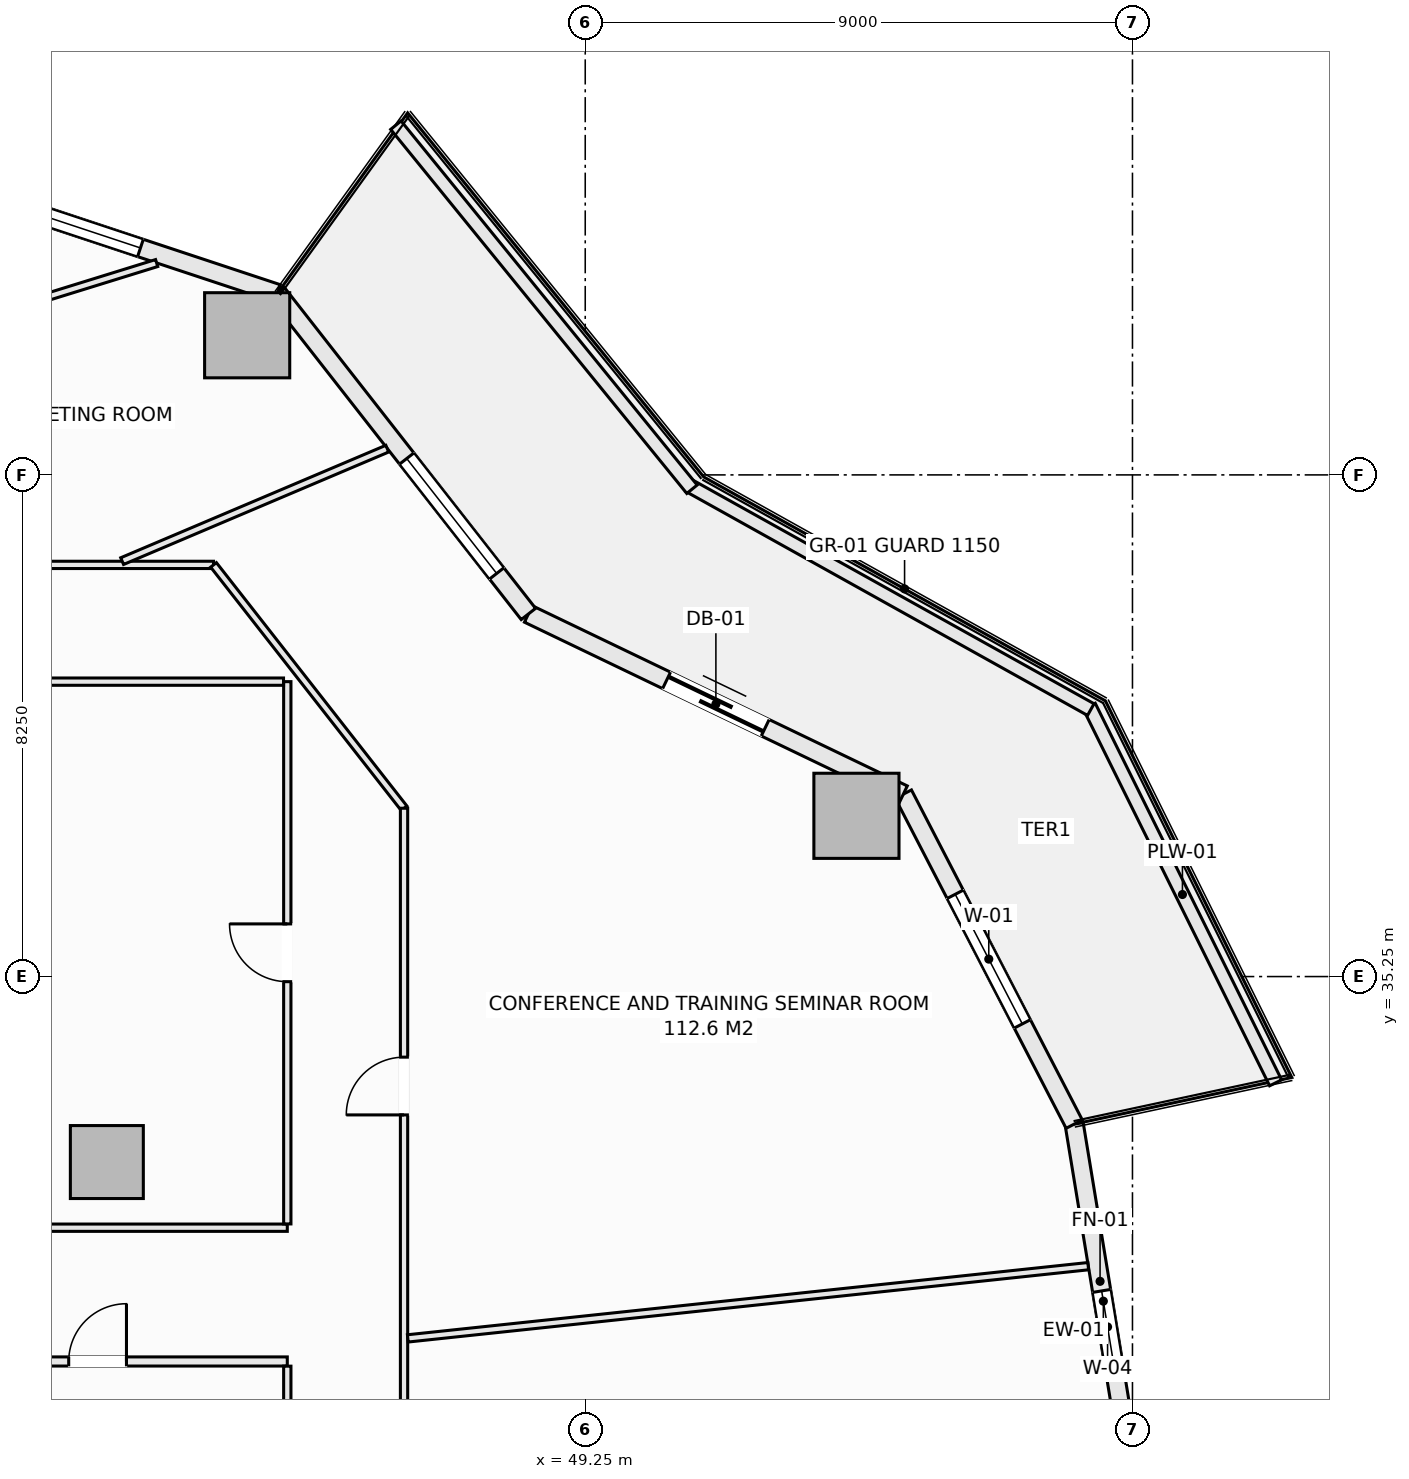
"""IFC4 building model, lengths in metres.
Left out: names, types, materials, properties, quantities, classifications, styles, units other than length and angle.
Written with IfcOpenShell. Run it as: python <this file> out.ifc"""

import sys

from ifc_helpers import new_model, si_unit, direction, frame, frame_2d, origin, origin_2d, place, context, subcontext, project, spatial, rectangle, extrude, element, fill, save


model = new_model("IFC4")
c1 = context("Model", 3, precision=1e-05, world=origin(), true_north=direction((0.0, 1.0)))
c2 = subcontext(c1, "Body", "Model", "MODEL_VIEW")
j1 = project(units=[si_unit("LENGTHUNIT", "METRE"), si_unit("PLANEANGLEUNIT", "RADIAN")], contexts=[c1])
p1 = place(None, origin())
s1 = spatial("IfcSite", under=j1, at=p1, CompositionType="ELEMENT")
p2 = place(p1, origin())
s2 = spatial("IfcBuilding", under=s1, at=p2, CompositionType="ELEMENT")
p3 = place(p2, frame((0.0, 0.0, 41.9)))
s3 = spatial("IfcBuildingStorey", under=s2, at=p3, CompositionType="ELEMENT", Elevation=41.9)
for number, where, z_axis, x_axis in (
    (1, (53.71, 37.894, -0.28), (0.0, 0.0, 1.0), (1.0, 0.0, 0.0)),
    (2, (43.69, 45.796, -0.28), (0.0, 0.0, 1.0), (1.0, 0.0, 0.0)),
):
    element("IfcColumn", number, at=place(p3, frame(where, z_axis=z_axis, x_axis=x_axis)), inside=s3, PredefinedType="COLUMN", context=c2, shape_type="SweptSolid", body=[
        extrude(rectangle(XDim=1.4, YDim=1.4, at=origin_2d()), origin(), (0.0, 0.0, 1.0), 3.85),
    ])
p4 = place(p3, frame((41.382, 32.199, -0.28), z_axis=(0.0, 0.0, 1.0), x_axis=(1.0, 0.0, 0.0)))
e3 = element("IfcColumn", 3, at=p4, inside=s3, PredefinedType="COLUMN", context=c2, shape_type="SweptSolid", body=[
    extrude(rectangle(XDim=1.2, YDim=1.2, at=origin_2d()), origin(), (0.0, 0.0, 1.0), 3.85),
])
p5 = place(p3, frame((57.292, 32.823, 0.0), z_axis=(0.0, 0.0, 1.0), x_axis=(0.162366057843, -0.98673059305, 0.0)))
e4 = element("IfcWall", 4, at=p5, inside=s3, PredefinedType="SOLIDWALL", context=c2, shape_type="SweptSolid", body=[
    extrude(rectangle(XDim=5.902, YDim=0.3, at=frame_2d((2.951, 0.0))), origin(), (0.0, 0.0, 1.0), 3.093),
])
p6 = place(p5, frame((2.78, 0.0, 0.72)))
e5 = element("IfcOpeningElement", 5, at=p6, cuts=e4, PredefinedType="OPENING", context=c2, shape_type="SweptSolid", body=[
    extrude(rectangle(XDim=1.2, YDim=1.65, at=frame_2d((0.6, 0.825))), frame((0.0, 0.16, 0.0), z_axis=(0.0, -1.0, 0.0), x_axis=(1.0, 0.0, 0.0)), (0.0, 0.0, 1.0), 0.32),
])
p7 = place(p3, frame((54.482, 38.25, 0.0), z_axis=(0.0, 0.0, 1.0), x_axis=(0.459809804413, -0.88801742312, 0.0)))
e6 = element("IfcWall", 6, at=p7, inside=s3, PredefinedType="SOLIDWALL", context=c2, shape_type="SweptSolid", body=[
    extrude(rectangle(XDim=6.111, YDim=0.3, at=frame_2d((3.055, 0.0))), origin(), (0.0, 0.0, 1.0), 3.093),
])
p8 = place(p7, frame((1.855, 0.0, 0.85)))
e7 = element("IfcOpeningElement", 7, at=p8, cuts=e6, PredefinedType="OPENING", context=c2, shape_type="SweptSolid", body=[
    extrude(rectangle(XDim=2.4, YDim=1.9, at=frame_2d((1.2, 0.95))), frame((0.0, 0.16, 0.0), z_axis=(0.0, -1.0, 0.0), x_axis=(1.0, 0.0, 0.0)), (0.0, 0.0, 1.0), 0.32),
])
p9 = place(p3, frame((48.315, 41.213, 0.0), z_axis=(0.0, 0.0, 1.0), x_axis=(0.901360393999, -0.433069786673, 0.0)))
e8 = element("IfcWall", 8, at=p9, inside=s3, PredefinedType="SOLIDWALL", context=c2, shape_type="SweptSolid", body=[
    extrude(rectangle(XDim=6.842, YDim=0.3, at=frame_2d((3.421, 0.0))), origin(), (0.0, 0.0, 1.0), 3.093),
])
p10 = place(p9, frame((2.521, 0.0, 0.0)))
e9 = element("IfcOpeningElement", 9, at=p10, cuts=e8, PredefinedType="OPENING", context=c2, shape_type="SweptSolid", body=[
    extrude(rectangle(XDim=1.8, YDim=2.25, at=frame_2d((0.9, 1.125))), frame((0.0, 0.16, 0.0), z_axis=(0.0, -1.0, 0.0), x_axis=(1.0, 0.0, 0.0)), (0.0, 0.0, 1.0), 0.32),
])
p11 = place(p3, frame((44.188, 46.486, 0.0), z_axis=(0.0, 0.0, 1.0), x_axis=(0.616421309777, -0.787416515482, 0.0)))
e10 = element("IfcWall", 10, at=p11, inside=s3, PredefinedType="SOLIDWALL", context=c2, shape_type="SweptSolid", body=[
    extrude(rectangle(XDim=6.696, YDim=0.3, at=frame_2d((3.348, 0.0))), origin(), (0.0, 0.0, 1.0), 3.093),
])
p12 = place(p11, frame((3.45, 0.0, 0.85)))
e11 = element("IfcOpeningElement", 11, at=p12, cuts=e10, PredefinedType="OPENING", context=c2, shape_type="SweptSolid", body=[
    extrude(rectangle(XDim=2.4, YDim=1.9, at=frame_2d((1.2, 0.95))), frame((0.0, 0.16, 0.0), z_axis=(0.0, -1.0, 0.0), x_axis=(1.0, 0.0, 0.0)), (0.0, 0.0, 1.0), 0.32),
])
p13 = place(p3, frame((37.404, 48.733, 0.0), z_axis=(0.0, 0.0, 1.0), x_axis=(0.949238715533, -0.31455661006, 0.0)))
e12 = element("IfcWall", 12, at=p13, inside=s3, PredefinedType="SOLIDWALL", context=c2, shape_type="SweptSolid", body=[
    extrude(rectangle(XDim=7.146, YDim=0.3, at=frame_2d((3.573, 0.0))), origin(), (0.0, 0.0, 1.0), 3.093),
])
p14 = place(p13, frame((2.373, 0.0, 0.85)))
e13 = element("IfcOpeningElement", 13, at=p14, cuts=e12, PredefinedType="OPENING", context=c2, shape_type="SweptSolid", body=[
    extrude(rectangle(XDim=2.4, YDim=1.9, at=frame_2d((1.2, 0.95))), frame((0.0, 0.16, 0.0), z_axis=(0.0, -1.0, 0.0), x_axis=(1.0, 0.0, 0.0)), (0.0, 0.0, 1.0), 0.32),
])
p15 = place(p3, frame((57.539, 39.697, 0.0), z_axis=(0.0, 0.0, 1.0), x_axis=(0.443578479433, -0.8962355341, 0.0)))
e14 = element("IfcWall", 14, at=p15, inside=s3, PredefinedType="PARAPET", context=c2, shape_type="SweptSolid", body=[
    extrude(rectangle(XDim=6.911, YDim=0.22, at=frame_2d((3.456, 0.0))), origin(), (0.0, 0.0, 1.0), 0.52),
])
p16 = place(p3, frame((50.959, 43.322, 0.0), z_axis=(0.0, 0.0, 1.0), x_axis=(0.873500119739, -0.48682393205, 0.0)))
e15 = element("IfcWall", 15, at=p16, inside=s3, PredefinedType="PARAPET", context=c2, shape_type="SweptSolid", body=[
    extrude(rectangle(XDim=7.562, YDim=0.22, at=frame_2d((3.781, 0.0))), origin(), (0.0, 0.0, 1.0), 0.52),
])
p17 = place(p3, frame((46.136, 49.251, 0.0), z_axis=(0.0, 0.0, 1.0), x_axis=(0.630997450658, -0.775784903993, 0.0)))
e16 = element("IfcWall", 16, at=p17, inside=s3, PredefinedType="PARAPET", context=c2, shape_type="SweptSolid", body=[
    extrude(rectangle(XDim=7.718, YDim=0.22, at=frame_2d((3.859, 0.0))), origin(), (0.0, 0.0, 1.0), 0.52),
])
p18 = place(p3, frame((30.077, 28.92, 0.0), z_axis=(0.0, 0.0, 1.0), x_axis=(1.0, 0.0, 0.0)))
e17 = element("IfcWall", 17, at=p18, inside=s3, PredefinedType="PARTITIONING", context=c2, shape_type="SweptSolid", body=[
    extrude(rectangle(XDim=14.273, YDim=0.15, at=frame_2d((7.137, 0.0))), origin(), (0.0, 0.0, 1.0), 3.57),
])
p19 = place(p18, frame((10.678, 0.0, 0.0)))
e18 = element("IfcOpeningElement", 18, at=p19, cuts=e17, PredefinedType="OPENING", context=c2, shape_type="SweptSolid", body=[
    extrude(rectangle(XDim=0.95, YDim=2.1, at=frame_2d((0.475, 1.05))), frame((0.0, 0.085, 0.0), z_axis=(0.0, -1.0, 0.0), x_axis=(1.0, 0.0, 0.0)), (0.0, 0.0, 1.0), 0.17),
])
p20 = place(p3, frame((39.02, 31.12, 0.0), z_axis=(0.0, 0.0, 1.0), x_axis=(1.0, 0.0, 0.0)))
e19 = element("IfcWall", 19, at=p20, inside=s3, PredefinedType="PARTITIONING", context=c2, shape_type="SweptSolid", body=[
    extrude(rectangle(XDim=5.33, YDim=0.12, at=frame_2d((2.665, 0.0))), origin(), (0.0, 0.0, 1.0), 3.57),
])
p21 = place(p3, frame((44.35, 25.197, 0.0), z_axis=(0.0, 0.0, 1.0), x_axis=(0.0, 1.0, 0.0)))
e20 = element("IfcWall", 20, at=p21, inside=s3, PredefinedType="PARTITIONING", context=c2, shape_type="SweptSolid", body=[
    extrude(rectangle(XDim=3.646, YDim=0.12, at=frame_2d((1.823, 0.0))), origin(), (0.0, 0.0, 1.0), 3.57),
])
p22 = place(p3, frame((44.35, 31.182, 0.0), z_axis=(0.0, 0.0, 1.0), x_axis=(0.0, 1.0, 0.0)))
e21 = element("IfcWall", 21, at=p22, inside=s3, PredefinedType="PARTITIONING", context=c2, shape_type="SweptSolid", body=[
    extrude(rectangle(XDim=8.918, YDim=0.12, at=frame_2d((4.459, 0.0))), origin(), (0.0, 0.0, 1.0), 3.57),
])
p23 = place(p22, frame((3.984, 0.0, 0.0)))
e22 = element("IfcOpeningElement", 22, at=p23, cuts=e21, PredefinedType="OPENING", context=c2, shape_type="SweptSolid", body=[
    extrude(rectangle(XDim=0.95, YDim=2.1, at=frame_2d((0.475, 1.05))), frame((0.0, 0.07, 0.0), z_axis=(0.0, -1.0, 0.0), x_axis=(1.0, 0.0, 0.0)), (0.0, 0.0, 1.0), 0.14),
])
p24 = place(p3, frame((30.557, 40.1, 0.0), z_axis=(0.0, 0.0, 1.0), x_axis=(1.0, 0.0, 0.0)))
e23 = element("IfcWall", 23, at=p24, inside=s3, PredefinedType="PARTITIONING", context=c2, shape_type="SweptSolid", body=[
    extrude(rectangle(XDim=13.731, YDim=0.12, at=frame_2d((6.866, 0.0))), origin(), (0.0, 0.0, 1.0), 3.57),
])
p25 = place(p24, frame((2.979, 0.0, 0.0)))
e24 = element("IfcOpeningElement", 24, at=p25, cuts=e23, PredefinedType="OPENING", context=c2, shape_type="SweptSolid", body=[
    extrude(rectangle(XDim=0.95, YDim=2.1, at=frame_2d((0.475, 1.05))), frame((0.0, 0.07, 0.0), z_axis=(0.0, -1.0, 0.0), x_axis=(1.0, 0.0, 0.0)), (0.0, 0.0, 1.0), 0.14),
])
p26 = place(p3, frame((23.462, 42.02, 0.0), z_axis=(0.0, 0.0, 1.0), x_axis=(1.0, 0.0, 0.0)))
e25 = element("IfcWall", 25, at=p26, inside=s3, PredefinedType="PARTITIONING", context=c2, shape_type="SweptSolid", body=[
    extrude(rectangle(XDim=19.675, YDim=0.12, at=frame_2d((9.837, 0.0))), origin(), (0.0, 0.0, 1.0), 3.57),
])
p27 = place(p26, frame((9.798, 0.0, 0.0)))
e26 = element("IfcOpeningElement", 26, at=p27, cuts=e25, PredefinedType="OPENING", context=c2, shape_type="SweptSolid", body=[
    extrude(rectangle(XDim=0.95, YDim=2.1, at=frame_2d((0.475, 1.05))), frame((0.0, 0.07, 0.0), z_axis=(0.0, -1.0, 0.0), x_axis=(1.0, 0.0, 0.0)), (0.0, 0.0, 1.0), 0.14),
])
p28 = place(p26, frame((1.357, 0.0, 0.0)))
e27 = element("IfcOpeningElement", 27, at=p28, cuts=e25, PredefinedType="OPENING", context=c2, shape_type="SweptSolid", body=[
    extrude(rectangle(XDim=0.95, YDim=2.1, at=frame_2d((0.475, 1.05))), frame((0.0, 0.07, 0.0), z_axis=(0.0, -1.0, 0.0), x_axis=(1.0, 0.0, 0.0)), (0.0, 0.0, 1.0), 0.14),
])
p29 = place(p3, frame((43.137, 42.02, 0.0), z_axis=(0.0, 0.0, 1.0), x_axis=(0.616441660183, -0.787400583941, 0.0)))
e28 = element("IfcWall", 28, at=p29, inside=s3, PredefinedType="PARTITIONING", context=c2, shape_type="SweptSolid", body=[
    extrude(rectangle(XDim=5.083, YDim=0.12, at=frame_2d((2.541, 0.0))), origin(), (0.0, 0.0, 1.0), 3.57),
])
p30 = place(p3, frame((46.27, 15.982, 0.0), z_axis=(0.0, 0.0, 1.0), x_axis=(0.0, 1.0, 0.0)))
e29 = element("IfcWall", 29, at=p30, inside=s3, PredefinedType="PARTITIONING", context=c2, shape_type="SweptSolid", body=[
    extrude(rectangle(XDim=22.036, YDim=0.12, at=frame_2d((11.018, 0.0))), origin(), (0.0, 0.0, 1.0), 3.57),
])
p31 = place(p30, frame((2.491, 0.0, 0.0)))
e30 = element("IfcOpeningElement", 30, at=p31, cuts=e29, PredefinedType="OPENING", context=c2, shape_type="SweptSolid", body=[
    extrude(rectangle(XDim=0.95, YDim=2.1, at=frame_2d((0.475, 1.05))), frame((0.0, 0.07, 0.0), z_axis=(0.0, -1.0, 0.0), x_axis=(1.0, 0.0, 0.0)), (0.0, 0.0, 1.0), 0.14),
])
p32 = place(p30, frame((8.925, 0.0, 0.0)))
e31 = element("IfcOpeningElement", 31, at=p32, cuts=e29, PredefinedType="OPENING", context=c2, shape_type="SweptSolid", body=[
    extrude(rectangle(XDim=0.95, YDim=2.1, at=frame_2d((0.475, 1.05))), frame((0.0, 0.07, 0.0), z_axis=(0.0, -1.0, 0.0), x_axis=(1.0, 0.0, 0.0)), (0.0, 0.0, 1.0), 0.14),
])
p33 = place(p30, frame((16.993, 0.0, 0.0)))
e32 = element("IfcOpeningElement", 32, at=p33, cuts=e29, PredefinedType="OPENING", context=c2, shape_type="SweptSolid", body=[
    extrude(rectangle(XDim=0.95, YDim=2.1, at=frame_2d((0.475, 1.05))), frame((0.0, 0.07, 0.0), z_axis=(0.0, -1.0, 0.0), x_axis=(1.0, 0.0, 0.0)), (0.0, 0.0, 1.0), 0.14),
])
p34 = place(p3, frame((41.634, 42.082, 0.0), z_axis=(0.0, 0.0, 1.0), x_axis=(0.920618281514, 0.39046380081, 0.0)))
e33 = element("IfcWall", 33, at=p34, inside=s3, PredefinedType="PARTITIONING", context=c2, shape_type="SweptSolid", body=[
    extrude(rectangle(XDim=4.736, YDim=0.12, at=frame_2d((2.368, 0.0))), origin(), (0.0, 0.0, 1.0), 3.57),
])
p35 = place(p3, frame((46.332, 29.3, 0.0), z_axis=(0.0, 0.0, 1.0), x_axis=(0.994414134786, 0.105548702209, 0.0)))
e34 = element("IfcWall", 34, at=p35, inside=s3, PredefinedType="PARTITIONING", context=c2, shape_type="SweptSolid", body=[
    extrude(rectangle(XDim=11.253, YDim=0.12, at=frame_2d((5.626, 0.0))), origin(), (0.0, 0.0, 1.0), 3.57),
])
p36 = place(p3, frame((26.572, 42.142, 0.0), z_axis=(0.0, 0.0, 1.0), x_axis=(0.955220139549, 0.295896071282, 0.0)))
e35 = element("IfcWall", 35, at=p36, inside=s3, PredefinedType="PARTITIONING", context=c2, shape_type="SweptSolid", body=[
    extrude(rectangle(XDim=16.362, YDim=0.12, at=frame_2d((8.181, 0.0))), origin(), (0.0, 0.0, 1.0), 3.093),
])
p37 = place(p6, origin())
e36 = element("IfcWindow", 36, at=p37, inside=s3, PartitioningType="SINGLE_PANEL", PredefinedType="WINDOW", context=c2, shape_type="SweptSolid", body=[
    extrude(rectangle(XDim=1.2, YDim=1.65, at=frame_2d((0.6, 0.825))), frame((0.0, 0.03, 0.0), z_axis=(0.0, -1.0, 0.0), x_axis=(1.0, 0.0, 0.0)), (0.0, 0.0, 1.0), 0.06),
])
fill(e5, e36)
p38 = place(p8, origin())
e37 = element("IfcWindow", 37, at=p38, inside=s3, PartitioningType="SINGLE_PANEL", PredefinedType="WINDOW", context=c2, shape_type="SweptSolid", body=[
    extrude(rectangle(XDim=2.4, YDim=1.9, at=frame_2d((1.2, 0.95))), frame((0.0, 0.03, 0.0), z_axis=(0.0, -1.0, 0.0), x_axis=(1.0, 0.0, 0.0)), (0.0, 0.0, 1.0), 0.06),
])
fill(e7, e37)
p39 = place(p10, origin())
e38 = element("IfcDoor", 38, at=p39, inside=s3, OperationType="SLIDING_TO_LEFT", PredefinedType="DOOR", context=c2, shape_type="SweptSolid", body=[
    extrude(rectangle(XDim=1.8, YDim=2.25, at=frame_2d((0.9, 1.125))), frame((0.0, 0.025, 0.0), z_axis=(0.0, -1.0, 0.0), x_axis=(1.0, 0.0, 0.0)), (0.0, 0.0, 1.0), 0.05),
])
fill(e9, e38)
p40 = place(p12, origin())
e39 = element("IfcWindow", 39, at=p40, inside=s3, PartitioningType="SINGLE_PANEL", PredefinedType="WINDOW", context=c2, shape_type="SweptSolid", body=[
    extrude(rectangle(XDim=2.4, YDim=1.9, at=frame_2d((1.2, 0.95))), frame((0.0, 0.03, 0.0), z_axis=(0.0, -1.0, 0.0), x_axis=(1.0, 0.0, 0.0)), (0.0, 0.0, 1.0), 0.06),
])
fill(e11, e39)
p41 = place(p14, origin())
e40 = element("IfcWindow", 40, at=p41, inside=s3, PartitioningType="SINGLE_PANEL", PredefinedType="WINDOW", context=c2, shape_type="SweptSolid", body=[
    extrude(rectangle(XDim=2.4, YDim=1.9, at=frame_2d((1.2, 0.95))), frame((0.0, 0.03, 0.0), z_axis=(0.0, -1.0, 0.0), x_axis=(1.0, 0.0, 0.0)), (0.0, 0.0, 1.0), 0.06),
])
fill(e13, e40)
p42 = place(p19, origin())
e41 = element("IfcDoor", 41, at=p42, inside=s3, OperationType="SINGLE_SWING_RIGHT", PredefinedType="DOOR", context=c2, shape_type="SweptSolid", body=[
    extrude(rectangle(XDim=0.95, YDim=2.1, at=frame_2d((0.475, 1.05))), frame((0.0, 0.025, 0.0), z_axis=(0.0, -1.0, 0.0), x_axis=(1.0, 0.0, 0.0)), (0.0, 0.0, 1.0), 0.05),
])
fill(e18, e41)
p43 = place(p33, origin())
e42 = element("IfcDoor", 42, at=p43, inside=s3, OperationType="SINGLE_SWING_LEFT", PredefinedType="DOOR", context=c2, shape_type="SweptSolid", body=[
    extrude(rectangle(XDim=0.95, YDim=2.1, at=frame_2d((0.475, 1.05))), frame((0.0, 0.025, 0.0), z_axis=(0.0, -1.0, 0.0), x_axis=(1.0, 0.0, 0.0)), (0.0, 0.0, 1.0), 0.05),
])
fill(e32, e42)
p44 = place(p23, origin())
e43 = element("IfcDoor", 43, at=p44, inside=s3, OperationType="SINGLE_SWING_RIGHT", PredefinedType="DOOR", context=c2, shape_type="SweptSolid", body=[
    extrude(rectangle(XDim=0.95, YDim=2.1, at=frame_2d((0.475, 1.05))), frame((0.0, 0.025, 0.0), z_axis=(0.0, -1.0, 0.0), x_axis=(1.0, 0.0, 0.0)), (0.0, 0.0, 1.0), 0.05),
])
fill(e22, e43)
save(model, sys.argv[1])
